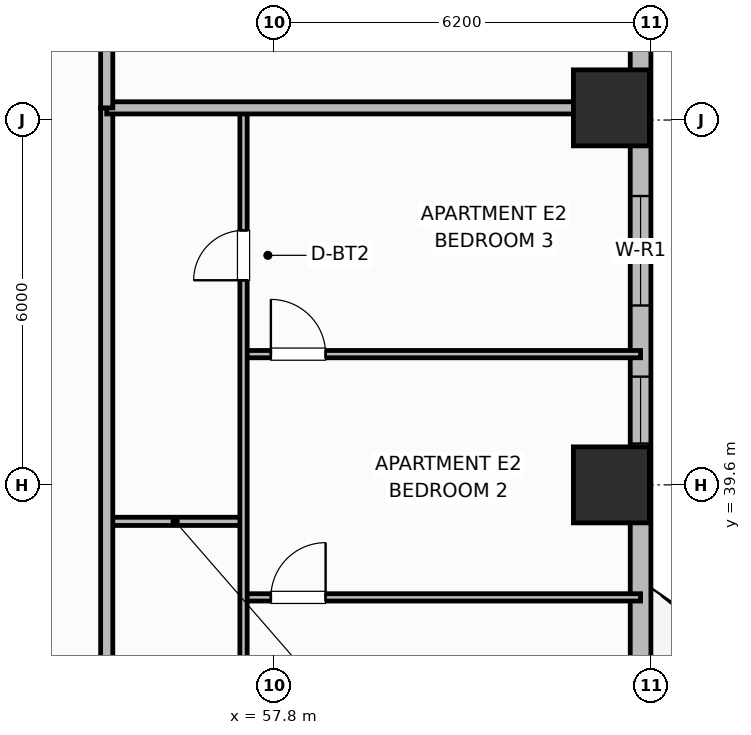
"""IFC4 building model, lengths in metres.
Left out: names, types, materials, properties, quantities, classifications, styles, units other than length and angle.
Written with IfcOpenShell. Run it as: python <this file> out.ifc"""

import sys

from ifc_helpers import new_model, si_unit, direction, frame, frame_2d, origin, origin_2d, place, context, subcontext, project, spatial, rectangle, extrude, element, fill, save


model = new_model("IFC4")
c1 = context("Model", 3, precision=1e-05, world=origin(), true_north=direction((0.0, 1.0)))
c2 = subcontext(c1, "Body", "Model", "MODEL_VIEW")
j1 = project(units=[si_unit("LENGTHUNIT", "METRE"), si_unit("PLANEANGLEUNIT", "RADIAN")], contexts=[c1])
p1 = place(None, origin())
s1 = spatial("IfcSite", under=j1, at=p1, CompositionType="ELEMENT")
p2 = place(p1, origin())
s2 = spatial("IfcBuilding", under=s1, at=p2, CompositionType="ELEMENT")
p3 = place(p2, frame((0.0, 0.0, 54.7)))
s3 = spatial("IfcBuildingStorey", under=s2, at=p3, CompositionType="ELEMENT", Elevation=54.7)
for number, where, z_axis, x_axis in (
    (1, (63.35, 39.6, 0.0), (0.0, 0.0, 1.0), (1.0, 0.0, 0.0)),
    (2, (63.35, 45.8, 0.0), (0.0, 0.0, 1.0), (1.0, 0.0, 0.0)),
):
    element("IfcColumn", number, at=place(p3, frame(where, z_axis=z_axis, x_axis=x_axis)), inside=s3, PredefinedType="COLUMN", context=c2, shape_type="SweptSolid", body=[
        extrude(rectangle(XDim=1.25, YDim=1.25, at=origin_2d()), origin(), (0.0, 0.0, 1.0), 3.7),
    ])
p4 = place(p3, frame((63.83, 32.6, 0.0), z_axis=(0.0, 0.0, 1.0), x_axis=(0.0, 1.0, 0.0)))
e3 = element("IfcWall", 3, at=p4, inside=s3, PredefinedType="SOLIDWALL", context=c2, shape_type="SweptSolid", body=[
    extrude(rectangle(XDim=14.8, YDim=0.34, at=frame_2d((7.4, 0.0))), origin(), (0.0, 0.0, 1.0), 2.7),
])
p5 = place(p4, frame((2.1, 0.0, 0.0)))
e4 = element("IfcOpeningElement", 4, at=p5, cuts=e3, PredefinedType="OPENING", context=c2, shape_type="SweptSolid", body=[
    extrude(rectangle(XDim=1.6, YDim=2.1, at=frame_2d((0.8, 1.05))), frame((0.0, 0.18, 0.0), z_axis=(0.0, -1.0, 0.0), x_axis=(1.0, 0.0, 0.0)), (0.0, 0.0, 1.0), 0.36),
])
p6 = place(p4, frame((7.68, 0.0, 0.89)))
e5 = element("IfcOpeningElement", 5, at=p6, cuts=e3, PredefinedType="OPENING", context=c2, shape_type="SweptSolid", body=[
    extrude(rectangle(XDim=1.1, YDim=1.65, at=frame_2d((0.55, 0.825))), frame((0.0, 0.18, 0.0), z_axis=(0.0, -1.0, 0.0), x_axis=(1.0, 0.0, 0.0)), (0.0, 0.0, 1.0), 0.36),
])
p7 = place(p4, frame((9.95, 0.0, 0.73)))
e6 = element("IfcOpeningElement", 6, at=p7, cuts=e3, PredefinedType="OPENING", context=c2, shape_type="SweptSolid", body=[
    extrude(rectangle(XDim=1.8, YDim=1.85, at=frame_2d((0.9, 0.925))), frame((0.0, 0.18, 0.0), z_axis=(0.0, -1.0, 0.0), x_axis=(1.0, 0.0, 0.0)), (0.0, 0.0, 1.0), 0.36),
])
p8 = place(p3, frame((55.05, 39.0, 0.0), z_axis=(0.0, 0.0, 1.0), x_axis=(1.0, 0.0, 0.0)))
e7 = element("IfcWall", 7, at=p8, inside=s3, PredefinedType="PARTITIONING", context=c2, shape_type="SweptSolid", body=[
    extrude(rectangle(XDim=2.25, YDim=0.135, at=frame_2d((1.125, 0.0))), origin(), (0.0, 0.0, 1.0), 2.53),
])
p9 = place(p3, frame((57.3, 37.75, 0.0), z_axis=(0.0, 0.0, 1.0), x_axis=(1.0, 0.0, 0.0)))
e8 = element("IfcWall", 8, at=p9, inside=s3, PredefinedType="PARTITIONING", context=c2, shape_type="SweptSolid", body=[
    extrude(rectangle(XDim=6.53, YDim=0.12, at=frame_2d((3.265, 0.0))), origin(), (0.0, 0.0, 1.0), 2.53),
])
p10 = place(p9, frame((0.45, 0.0, 0.0)))
e9 = element("IfcOpeningElement", 9, at=p10, cuts=e8, PredefinedType="OPENING", context=c2, shape_type="SweptSolid", body=[
    extrude(rectangle(XDim=0.9, YDim=2.1, at=frame_2d((0.45, 1.05))), frame((0.0, 0.07, 0.0), z_axis=(0.0, -1.0, 0.0), x_axis=(1.0, 0.0, 0.0)), (0.0, 0.0, 1.0), 0.14),
])
p11 = place(p3, frame((57.3, 41.75, 0.0), z_axis=(0.0, 0.0, 1.0), x_axis=(1.0, 0.0, 0.0)))
e10 = element("IfcWall", 10, at=p11, inside=s3, PredefinedType="PARTITIONING", context=c2, shape_type="SweptSolid", body=[
    extrude(rectangle(XDim=6.53, YDim=0.12, at=frame_2d((3.265, 0.0))), origin(), (0.0, 0.0, 1.0), 2.53),
])
p12 = place(p11, frame((0.45, 0.0, 0.0)))
e11 = element("IfcOpeningElement", 11, at=p12, cuts=e10, PredefinedType="OPENING", context=c2, shape_type="SweptSolid", body=[
    extrude(rectangle(XDim=0.9, YDim=2.1, at=frame_2d((0.45, 1.05))), frame((0.0, 0.07, 0.0), z_axis=(0.0, -1.0, 0.0), x_axis=(1.0, 0.0, 0.0)), (0.0, 0.0, 1.0), 0.14),
])
p13 = place(p3, frame((57.3, 29.84, 0.0), z_axis=(0.0, 0.0, 1.0), x_axis=(0.0, 1.0, 0.0)))
e12 = element("IfcWall", 12, at=p13, inside=s3, PredefinedType="PARTITIONING", context=c2, shape_type="SweptSolid", body=[
    extrude(rectangle(XDim=15.92, YDim=0.12, at=frame_2d((7.96, 0.0))), origin(), (0.0, 0.0, 1.0), 2.53),
])
p14 = place(p13, frame((0.41, 0.0, 0.0)))
e13 = element("IfcOpeningElement", 13, at=p14, cuts=e12, PredefinedType="OPENING", context=c2, shape_type="SweptSolid", body=[
    extrude(rectangle(XDim=0.9, YDim=2.1, at=frame_2d((0.45, 1.05))), frame((0.0, 0.07, 0.0), z_axis=(0.0, -1.0, 0.0), x_axis=(1.0, 0.0, 0.0)), (0.0, 0.0, 1.0), 0.14),
])
p15 = place(p13, frame((13.125, 0.0, 0.0)))
e14 = element("IfcOpeningElement", 14, at=p15, cuts=e12, PredefinedType="OPENING", context=c2, shape_type="SweptSolid", body=[
    extrude(rectangle(XDim=0.82, YDim=2.08, at=frame_2d((0.41, 1.04))), frame((0.0, 0.07, 0.0), z_axis=(0.0, -1.0, 0.0), x_axis=(1.0, 0.0, 0.0)), (0.0, 0.0, 1.0), 0.14),
])
p16 = place(p3, frame((55.05, 10.6, 0.0), z_axis=(0.0, 0.0, 1.0), x_axis=(0.0, 1.0, 0.0)))
e15 = element("IfcWall", 15, at=p16, inside=s3, PredefinedType="PARTITIONING", context=c2, shape_type="SweptSolid", body=[
    extrude(rectangle(XDim=35.2, YDim=0.2, at=frame_2d((17.6, 0.0))), origin(), (0.0, 0.0, 1.0), 2.53),
])
p17 = place(p16, frame((2.65, 0.0, 0.0)))
e16 = element("IfcOpeningElement", 16, at=p17, cuts=e15, PredefinedType="OPENING", context=c2, shape_type="SweptSolid", body=[
    extrude(rectangle(XDim=1.0, YDim=2.15, at=frame_2d((0.5, 1.075))), frame((0.0, 0.11, 0.0), z_axis=(0.0, -1.0, 0.0), x_axis=(1.0, 0.0, 0.0)), (0.0, 0.0, 1.0), 0.22),
])
p18 = place(p16, frame((22.75, 0.0, 0.0)))
e17 = element("IfcOpeningElement", 17, at=p18, cuts=e15, PredefinedType="OPENING", context=c2, shape_type="SweptSolid", body=[
    extrude(rectangle(XDim=1.0, YDim=2.15, at=frame_2d((0.5, 1.075))), frame((0.0, 0.11, 0.0), z_axis=(0.0, -1.0, 0.0), x_axis=(1.0, 0.0, 0.0)), (0.0, 0.0, 1.0), 0.22),
])
p19 = place(p3, frame((55.05, 45.8, 0.0), z_axis=(0.0, 0.0, 1.0), x_axis=(1.0, 0.0, 0.0)))
e18 = element("IfcWall", 18, at=p19, inside=s3, PredefinedType="PARTITIONING", context=c2, shape_type="SweptSolid", body=[
    extrude(rectangle(XDim=8.36, YDim=0.2, at=frame_2d((4.18, 0.0))), origin(), (0.0, 0.0, 1.0), 2.53),
])
p20 = place(p3, frame((55.05, 45.8, 0.0), z_axis=(0.0, 0.0, 1.0), x_axis=(0.0, 1.0, 0.0)))
e19 = element("IfcWall", 19, at=p20, inside=s3, PredefinedType="PARTITIONING", context=c2, shape_type="SweptSolid", body=[
    extrude(rectangle(XDim=5.63, YDim=0.2, at=frame_2d((2.815, 0.0))), origin(), (0.0, 0.0, 1.0), 2.53),
])
p21 = place(p6, origin())
e20 = element("IfcWindow", 20, at=p21, inside=s3, PartitioningType="SINGLE_PANEL", PredefinedType="WINDOW", context=c2, shape_type="SweptSolid", body=[
    extrude(rectangle(XDim=1.1, YDim=1.65, at=frame_2d((0.55, 0.825))), frame((0.0, 0.03, 0.0), z_axis=(0.0, -1.0, 0.0), x_axis=(1.0, 0.0, 0.0)), (0.0, 0.0, 1.0), 0.06),
])
fill(e5, e20)
p22 = place(p7, origin())
e21 = element("IfcWindow", 21, at=p22, inside=s3, PartitioningType="SINGLE_PANEL", PredefinedType="WINDOW", context=c2, shape_type="SweptSolid", body=[
    extrude(rectangle(XDim=1.8, YDim=1.85, at=frame_2d((0.9, 0.925))), frame((0.0, 0.03, 0.0), z_axis=(0.0, -1.0, 0.0), x_axis=(1.0, 0.0, 0.0)), (0.0, 0.0, 1.0), 0.06),
])
fill(e6, e21)
p23 = place(p10, origin())
e22 = element("IfcDoor", 22, at=p23, inside=s3, OperationType="SINGLE_SWING_RIGHT", PredefinedType="DOOR", context=c2, shape_type="SweptSolid", body=[
    extrude(rectangle(XDim=0.9, YDim=2.1, at=frame_2d((0.45, 1.05))), frame((0.0, 0.025, 0.0), z_axis=(0.0, -1.0, 0.0), x_axis=(1.0, 0.0, 0.0)), (0.0, 0.0, 1.0), 0.05),
])
fill(e9, e22)
p24 = place(p12, origin())
e23 = element("IfcDoor", 23, at=p24, inside=s3, OperationType="SINGLE_SWING_LEFT", PredefinedType="DOOR", context=c2, shape_type="SweptSolid", body=[
    extrude(rectangle(XDim=0.9, YDim=2.1, at=frame_2d((0.45, 1.05))), frame((0.0, 0.025, 0.0), z_axis=(0.0, -1.0, 0.0), x_axis=(1.0, 0.0, 0.0)), (0.0, 0.0, 1.0), 0.05),
])
fill(e11, e23)
p25 = place(p15, origin())
e24 = element("IfcDoor", 24, at=p25, inside=s3, OperationType="SINGLE_SWING_LEFT", PredefinedType="DOOR", context=c2, shape_type="SweptSolid", body=[
    extrude(rectangle(XDim=0.82, YDim=2.08, at=frame_2d((0.41, 1.04))), frame((0.0, 0.025, 0.0), z_axis=(0.0, -1.0, 0.0), x_axis=(1.0, 0.0, 0.0)), (0.0, 0.0, 1.0), 0.05),
])
fill(e14, e24)
save(model, sys.argv[1])
